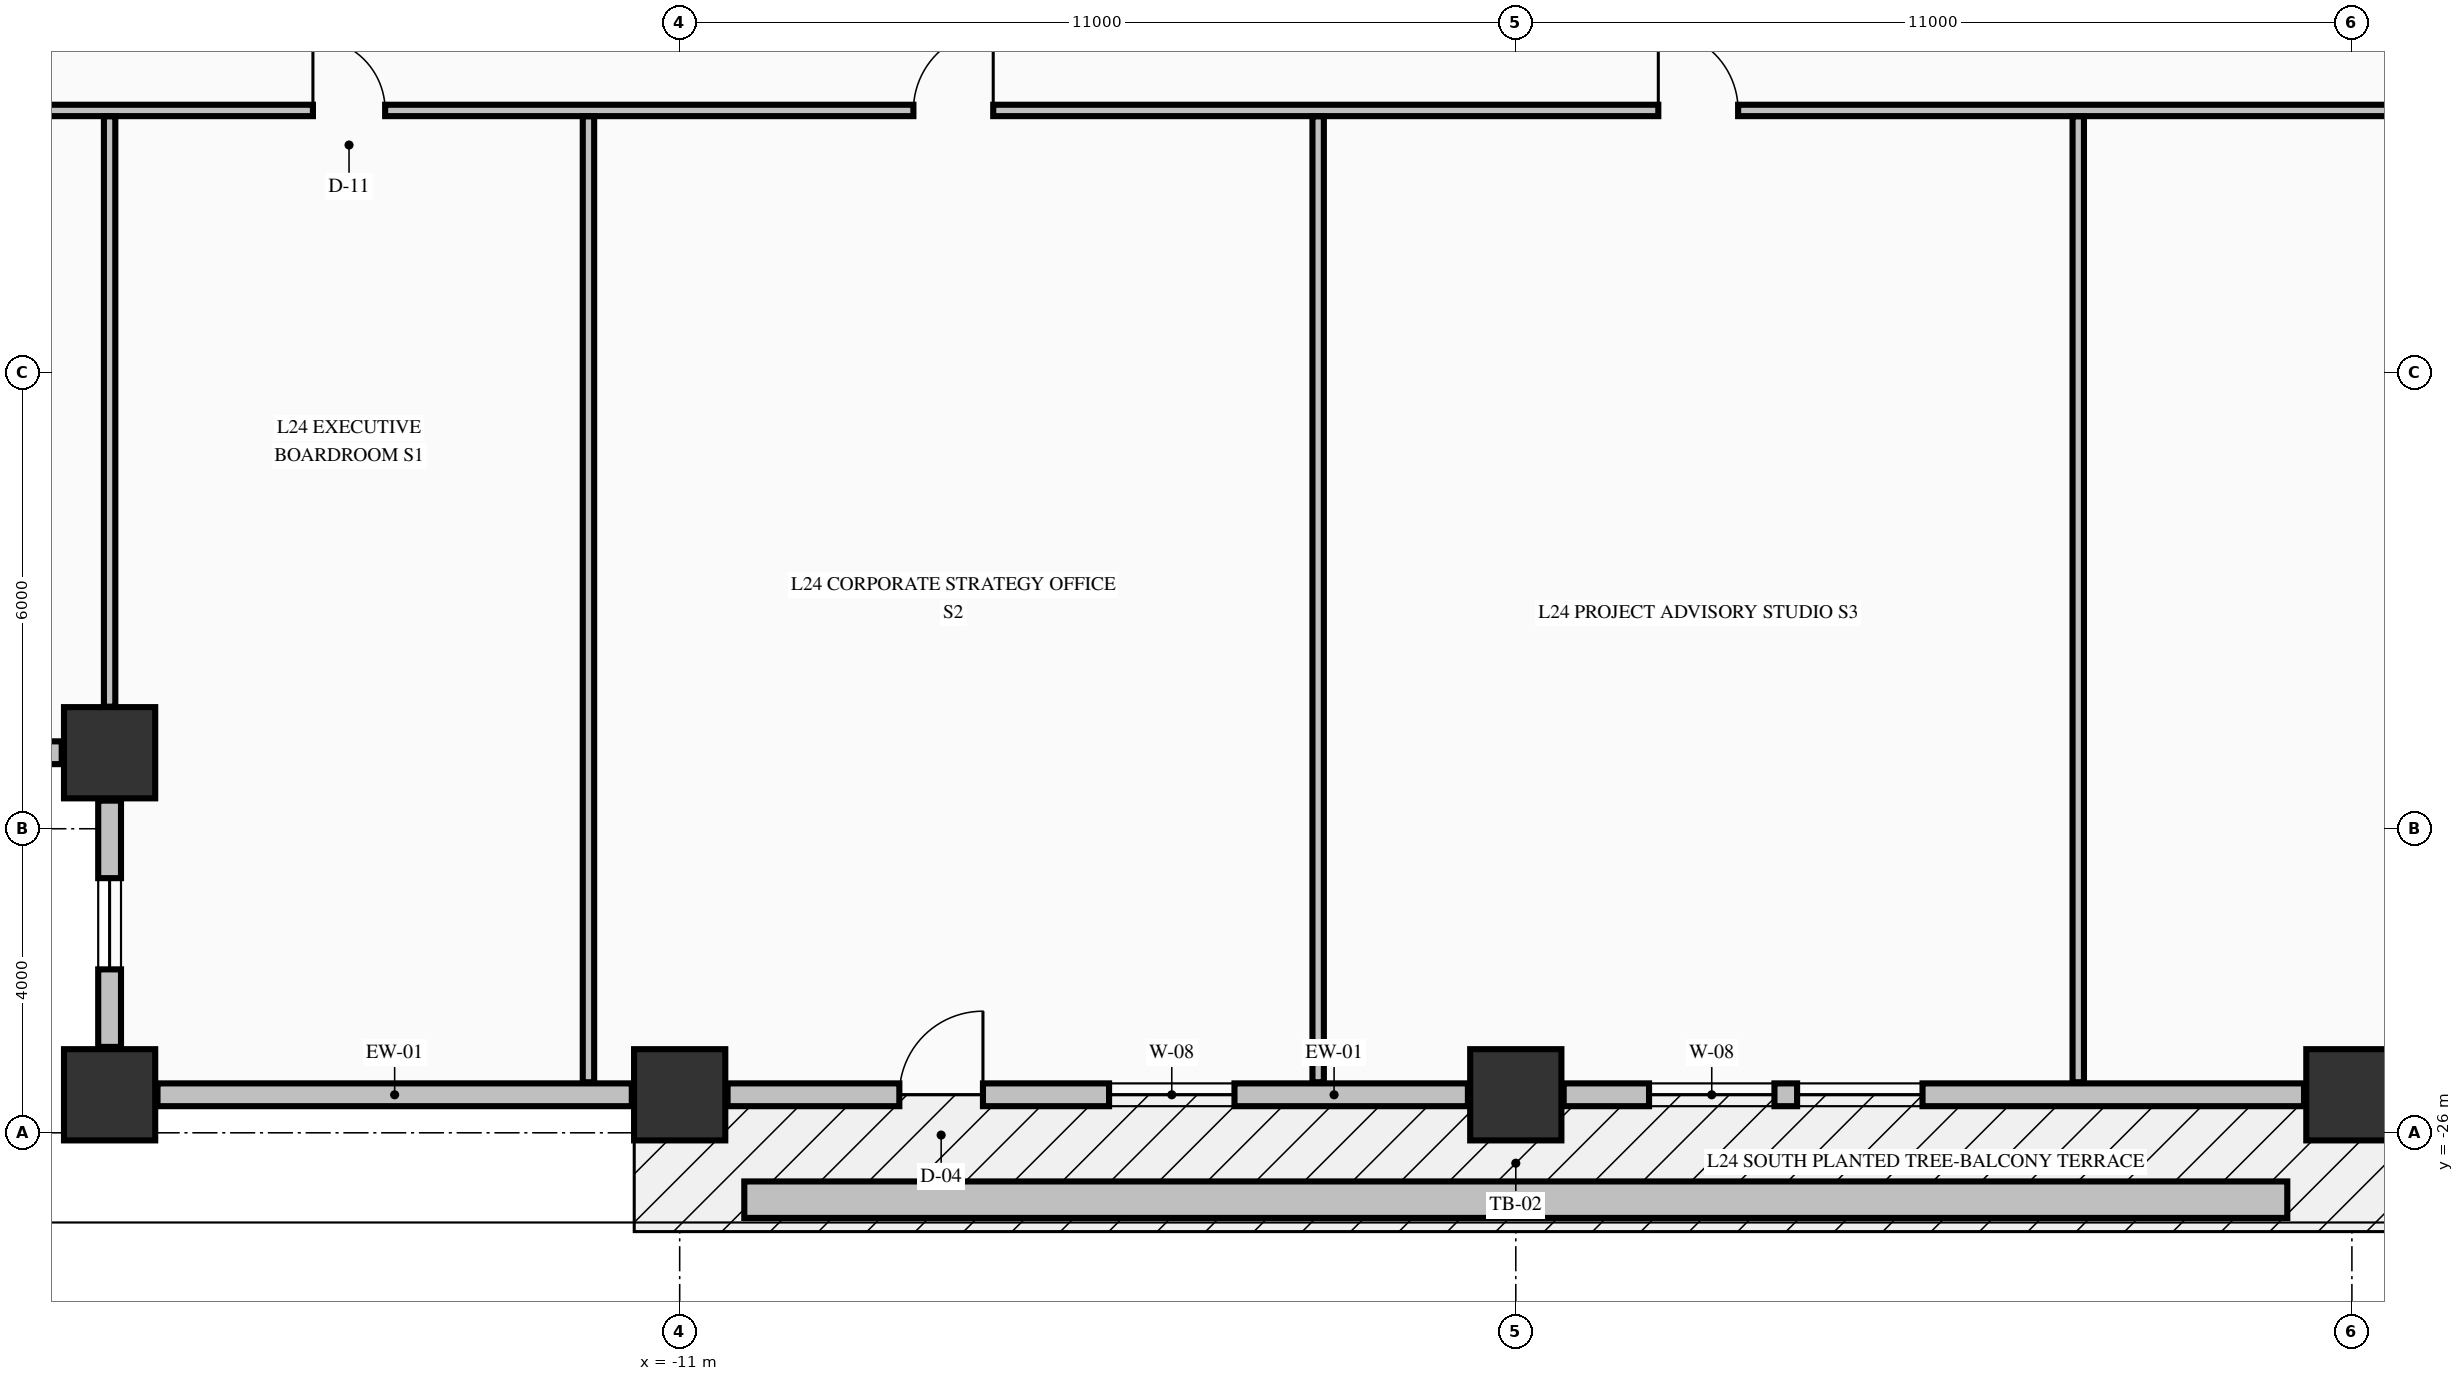
"""IFC4 building model, lengths in metres.
Left out: names, types, materials, properties, quantities, classifications, styles, units other than length and angle.
Written with IfcOpenShell. Run it as: python <this file> out.ifc"""

import sys

from ifc_helpers import new_model, si_unit, direction, frame, frame_2d, origin, origin_2d, place, context, subcontext, project, spatial, rectangle, extrude, element, fill, save


model = new_model("IFC4")
c1 = context("Model", 3, precision=1e-05, world=origin(), true_north=direction((0.0, 1.0)))
c2 = subcontext(c1, "Body", "Model", "MODEL_VIEW")
j1 = project(units=[si_unit("LENGTHUNIT", "METRE"), si_unit("PLANEANGLEUNIT", "RADIAN")], contexts=[c1])
p1 = place(None, origin())
s1 = spatial("IfcSite", under=j1, at=p1, CompositionType="ELEMENT")
p2 = place(p1, origin())
s2 = spatial("IfcBuilding", under=s1, at=p2, CompositionType="ELEMENT")
p3 = place(p2, frame((0.0, 0.0, 98.5)))
s3 = spatial("IfcBuildingStorey", under=s2, at=p3, CompositionType="ELEMENT", Elevation=98.5)
for number, where, z_axis, x_axis in (
    (1, (-18.5, -25.5, -0.275), (0.0, 0.0, 1.0), (1.0, 0.0, 0.0)),
    (2, (-11.0, -25.5, -0.275), (0.0, 0.0, 1.0), (1.0, 0.0, 0.0)),
    (3, (0.0, -25.5, -0.275), (0.0, 0.0, 1.0), (1.0, 0.0, 0.0)),
    (4, (11.0, -25.5, -0.275), (0.0, 0.0, 1.0), (1.0, 0.0, 0.0)),
    (5, (-18.5, -21.0, -0.275), (0.0, 0.0, 1.0), (1.0, 0.0, 0.0)),
):
    element("IfcColumn", number, at=place(p3, frame(where, z_axis=z_axis, x_axis=x_axis)), inside=s3, PredefinedType="COLUMN", context=c2, shape_type="SweptSolid", body=[
        extrude(rectangle(XDim=1.2, YDim=1.2, at=origin_2d()), origin(), (0.0, 0.0, 1.0), 3.595),
    ])
p4 = place(p3, frame((-22.37, -21.0, 0.0), z_axis=(0.0, 0.0, 1.0), x_axis=(1.0, 0.0, 0.0)))
e6 = element("IfcWall", 6, at=p4, inside=s3, PredefinedType="STANDARD", context=c2, shape_type="SweptSolid", body=[
    extrude(rectangle(XDim=3.24, YDim=0.3, at=frame_2d((1.62, 0.0))), origin(), (0.0, 0.0, 1.0), 2.712),
])
p5 = place(p4, frame((1.02, 0.0, 0.82)))
e7 = element("IfcOpeningElement", 7, at=p5, cuts=e6, PredefinedType="OPENING", context=c2, shape_type="SweptSolid", body=[
    extrude(rectangle(XDim=1.2, YDim=1.65, at=frame_2d((0.6, 0.825))), frame((0.0, 0.16, 0.0), z_axis=(0.0, -1.0, 0.0), x_axis=(1.0, 0.0, 0.0)), (0.0, 0.0, 1.0), 0.32),
])
p6 = place(p3, frame((-18.5, -21.63, 0.0), z_axis=(0.0, 0.0, 1.0), x_axis=(0.0, -1.0, 0.0)))
e8 = element("IfcWall", 8, at=p6, inside=s3, PredefinedType="STANDARD", context=c2, shape_type="SweptSolid", body=[
    extrude(rectangle(XDim=3.24, YDim=0.3, at=frame_2d((1.62, 0.0))), origin(), (0.0, 0.0, 1.0), 2.712),
])
p7 = place(p6, frame((1.02, 0.0, 0.82)))
e9 = element("IfcOpeningElement", 9, at=p7, cuts=e8, PredefinedType="OPENING", context=c2, shape_type="SweptSolid", body=[
    extrude(rectangle(XDim=1.2, YDim=1.65, at=frame_2d((0.6, 0.825))), frame((0.0, 0.16, 0.0), z_axis=(0.0, -1.0, 0.0), x_axis=(1.0, 0.0, 0.0)), (0.0, 0.0, 1.0), 0.32),
])
p8 = place(p3, frame((-17.87, -25.5, 0.0), z_axis=(0.0, 0.0, 1.0), x_axis=(1.0, 0.0, 0.0)))
e10 = element("IfcWall", 10, at=p8, inside=s3, PredefinedType="STANDARD", context=c2, shape_type="SweptSolid", body=[
    extrude(rectangle(XDim=6.24, YDim=0.3, at=frame_2d((3.12, 0.0))), origin(), (0.0, 0.0, 1.0), 2.712),
])
p9 = place(p3, frame((-10.37, -25.5, 0.0), z_axis=(0.0, 0.0, 1.0), x_axis=(1.0, 0.0, 0.0)))
e11 = element("IfcWall", 11, at=p9, inside=s3, PredefinedType="STANDARD", context=c2, shape_type="SweptSolid", body=[
    extrude(rectangle(XDim=9.74, YDim=0.3, at=frame_2d((4.87, 0.0))), origin(), (0.0, 0.0, 1.0), 2.712),
])
p10 = place(p9, frame((2.26, 0.0, 0.0)))
e12 = element("IfcOpeningElement", 12, at=p10, cuts=e11, PredefinedType="OPENING", context=c2, shape_type="SweptSolid", body=[
    extrude(rectangle(XDim=1.1, YDim=2.15, at=frame_2d((0.55, 1.075))), frame((0.0, 0.16, 0.0), z_axis=(0.0, -1.0, 0.0), x_axis=(1.0, 0.0, 0.0)), (0.0, 0.0, 1.0), 0.32),
])
p11 = place(p9, frame((5.019, 0.0, 0.8)))
e13 = element("IfcOpeningElement", 13, at=p11, cuts=e11, PredefinedType="OPENING", context=c2, shape_type="SweptSolid", body=[
    extrude(rectangle(XDim=1.65, YDim=1.7, at=frame_2d((0.825, 0.85))), frame((0.0, 0.16, 0.0), z_axis=(0.0, -1.0, 0.0), x_axis=(1.0, 0.0, 0.0)), (0.0, 0.0, 1.0), 0.32),
])
p12 = place(p3, frame((0.63, -25.5, 0.0), z_axis=(0.0, 0.0, 1.0), x_axis=(1.0, 0.0, 0.0)))
e14 = element("IfcWall", 14, at=p12, inside=s3, PredefinedType="STANDARD", context=c2, shape_type="SweptSolid", body=[
    extrude(rectangle(XDim=9.74, YDim=0.3, at=frame_2d((4.87, 0.0))), origin(), (0.0, 0.0, 1.0), 2.712),
])
p13 = place(p12, frame((1.123, 0.0, 0.8)))
e15 = element("IfcOpeningElement", 15, at=p13, cuts=e14, PredefinedType="OPENING", context=c2, shape_type="SweptSolid", body=[
    extrude(rectangle(XDim=1.65, YDim=1.7, at=frame_2d((0.825, 0.85))), frame((0.0, 0.16, 0.0), z_axis=(0.0, -1.0, 0.0), x_axis=(1.0, 0.0, 0.0)), (0.0, 0.0, 1.0), 0.32),
])
p14 = place(p12, frame((3.071, 0.0, 0.8)))
e16 = element("IfcOpeningElement", 16, at=p14, cuts=e14, PredefinedType="OPENING", context=c2, shape_type="SweptSolid", body=[
    extrude(rectangle(XDim=1.65, YDim=1.7, at=frame_2d((0.825, 0.85))), frame((0.0, 0.16, 0.0), z_axis=(0.0, -1.0, 0.0), x_axis=(1.0, 0.0, 0.0)), (0.0, 0.0, 1.0), 0.32),
])
p15 = place(p3, frame((-22.835, -12.55, 0.0), z_axis=(0.0, 0.0, 1.0), x_axis=(1.0, 0.0, 0.0)))
e17 = element("IfcWall", 17, at=p15, inside=s3, PredefinedType="PARTITIONING", context=c2, shape_type="SweptSolid", body=[
    extrude(rectangle(XDim=50.67, YDim=0.15, at=frame_2d((25.335, 0.0))), origin(), (0.0, 0.0, 1.0), 3.32),
])
p16 = place(p15, frame((7.01, 0.0, 0.0)))
e18 = element("IfcOpeningElement", 18, at=p16, cuts=e17, PredefinedType="OPENING", context=c2, shape_type="SweptSolid", body=[
    extrude(rectangle(XDim=0.95, YDim=2.15, at=frame_2d((0.475, 1.075))), frame((0.0, 0.085, 0.0), z_axis=(0.0, -1.0, 0.0), x_axis=(1.0, 0.0, 0.0)), (0.0, 0.0, 1.0), 0.17),
])
p17 = place(p15, frame((14.91, 0.0, 0.0)))
e19 = element("IfcOpeningElement", 19, at=p17, cuts=e17, PredefinedType="OPENING", context=c2, shape_type="SweptSolid", body=[
    extrude(rectangle(XDim=1.05, YDim=2.15, at=frame_2d((0.525, 1.075))), frame((0.0, 0.085, 0.0), z_axis=(0.0, -1.0, 0.0), x_axis=(1.0, 0.0, 0.0)), (0.0, 0.0, 1.0), 0.17),
])
p18 = place(p15, frame((24.71, 0.0, 0.0)))
e20 = element("IfcOpeningElement", 20, at=p18, cuts=e17, PredefinedType="OPENING", context=c2, shape_type="SweptSolid", body=[
    extrude(rectangle(XDim=1.05, YDim=2.15, at=frame_2d((0.525, 1.075))), frame((0.0, 0.085, 0.0), z_axis=(0.0, -1.0, 0.0), x_axis=(1.0, 0.0, 0.0)), (0.0, 0.0, 1.0), 0.17),
])
p19 = place(p15, frame((35.91, 0.0, 0.0)))
e21 = element("IfcOpeningElement", 21, at=p19, cuts=e17, PredefinedType="OPENING", context=c2, shape_type="SweptSolid", body=[
    extrude(rectangle(XDim=1.05, YDim=2.15, at=frame_2d((0.525, 1.075))), frame((0.0, 0.085, 0.0), z_axis=(0.0, -1.0, 0.0), x_axis=(1.0, 0.0, 0.0)), (0.0, 0.0, 1.0), 0.17),
])
p20 = place(p3, frame((-18.5, -20.394, 0.0), z_axis=(0.0, 0.0, 1.0), x_axis=(0.0, 1.0, 0.0)))
e22 = element("IfcWall", 22, at=p20, inside=s3, PredefinedType="PARTITIONING", context=c2, shape_type="SweptSolid", body=[
    extrude(rectangle(XDim=7.766, YDim=0.15, at=frame_2d((3.883, 0.0))), origin(), (0.0, 0.0, 1.0), 3.32),
])
for number, where, z_axis, x_axis in (
    (23, (-12.2, -25.335, 0.0), (0.0, 0.0, 1.0), (0.0, 1.0, 0.0)),
    (24, (-2.6, -25.335, 0.0), (0.0, 0.0, 1.0), (0.0, 1.0, 0.0)),
    (25, (7.4, -25.335, 0.0), (0.0, 0.0, 1.0), (0.0, 1.0, 0.0)),
):
    element("IfcWall", number, at=place(p3, frame(where, z_axis=z_axis, x_axis=x_axis)), inside=s3, PredefinedType="PARTITIONING", context=c2, shape_type="SweptSolid", body=[
        extrude(rectangle(XDim=12.707, YDim=0.15, at=frame_2d((6.354, 0.0))), origin(), (0.0, 0.0, 1.0), 3.32),
    ])
p21 = place(p3, frame((-10.15, -26.88, -0.04), z_axis=(0.0, 0.0, 1.0), x_axis=(1.0, 0.0, 0.0)))
e26 = element("IfcWall", 26, at=p21, inside=s3, PredefinedType="PARAPET", context=c2, shape_type="SweptSolid", body=[
    extrude(rectangle(XDim=20.3, YDim=0.48, at=frame_2d((10.15, 0.0))), origin(), (0.0, 0.0, 1.0), 0.52),
])
p22 = place(p7, origin())
e27 = element("IfcWindow", 27, at=p22, inside=s3, PartitioningType="SINGLE_PANEL", PredefinedType="WINDOW", context=c2, shape_type="SweptSolid", body=[
    extrude(rectangle(XDim=1.2, YDim=1.65, at=frame_2d((0.6, 0.825))), frame((0.0, 0.03, 0.0), z_axis=(0.0, -1.0, 0.0), x_axis=(1.0, 0.0, 0.0)), (0.0, 0.0, 1.0), 0.06),
])
fill(e9, e27)
p23 = place(p10, origin())
e28 = element("IfcDoor", 28, at=p23, inside=s3, OperationType="SINGLE_SWING_RIGHT", PredefinedType="DOOR", context=c2, shape_type="SweptSolid", body=[
    extrude(rectangle(XDim=1.1, YDim=2.15, at=frame_2d((0.55, 1.075))), frame((0.0, 0.025, 0.0), z_axis=(0.0, -1.0, 0.0), x_axis=(1.0, 0.0, 0.0)), (0.0, 0.0, 1.0), 0.05),
])
fill(e12, e28)
p24 = place(p11, origin())
e29 = element("IfcWindow", 29, at=p24, inside=s3, PartitioningType="SINGLE_PANEL", PredefinedType="WINDOW", context=c2, shape_type="SweptSolid", body=[
    extrude(rectangle(XDim=1.65, YDim=1.7, at=frame_2d((0.825, 0.85))), frame((0.0, 0.03, 0.0), z_axis=(0.0, -1.0, 0.0), x_axis=(1.0, 0.0, 0.0)), (0.0, 0.0, 1.0), 0.06),
])
fill(e13, e29)
p25 = place(p13, origin())
e30 = element("IfcWindow", 30, at=p25, inside=s3, PartitioningType="SINGLE_PANEL", PredefinedType="WINDOW", context=c2, shape_type="SweptSolid", body=[
    extrude(rectangle(XDim=1.65, YDim=1.7, at=frame_2d((0.825, 0.85))), frame((0.0, 0.03, 0.0), z_axis=(0.0, -1.0, 0.0), x_axis=(1.0, 0.0, 0.0)), (0.0, 0.0, 1.0), 0.06),
])
fill(e15, e30)
p26 = place(p14, origin())
e31 = element("IfcWindow", 31, at=p26, inside=s3, PartitioningType="SINGLE_PANEL", PredefinedType="WINDOW", context=c2, shape_type="SweptSolid", body=[
    extrude(rectangle(XDim=1.65, YDim=1.7, at=frame_2d((0.825, 0.85))), frame((0.0, 0.03, 0.0), z_axis=(0.0, -1.0, 0.0), x_axis=(1.0, 0.0, 0.0)), (0.0, 0.0, 1.0), 0.06),
])
fill(e16, e31)
p27 = place(p16, origin())
e32 = element("IfcDoor", 32, at=p27, inside=s3, OperationType="SINGLE_SWING_LEFT", PredefinedType="DOOR", context=c2, shape_type="SweptSolid", body=[
    extrude(rectangle(XDim=0.95, YDim=2.15, at=frame_2d((0.475, 1.075))), frame((0.0, 0.025, 0.0), z_axis=(0.0, -1.0, 0.0), x_axis=(1.0, 0.0, 0.0)), (0.0, 0.0, 1.0), 0.05),
])
fill(e18, e32)
p28 = place(p17, origin())
e33 = element("IfcDoor", 33, at=p28, inside=s3, OperationType="SINGLE_SWING_RIGHT", PredefinedType="DOOR", context=c2, shape_type="SweptSolid", body=[
    extrude(rectangle(XDim=1.05, YDim=2.15, at=frame_2d((0.525, 1.075))), frame((0.0, 0.025, 0.0), z_axis=(0.0, -1.0, 0.0), x_axis=(1.0, 0.0, 0.0)), (0.0, 0.0, 1.0), 0.05),
])
fill(e19, e33)
p29 = place(p18, origin())
e34 = element("IfcDoor", 34, at=p29, inside=s3, OperationType="SINGLE_SWING_LEFT", PredefinedType="DOOR", context=c2, shape_type="SweptSolid", body=[
    extrude(rectangle(XDim=1.05, YDim=2.15, at=frame_2d((0.525, 1.075))), frame((0.0, 0.025, 0.0), z_axis=(0.0, -1.0, 0.0), x_axis=(1.0, 0.0, 0.0)), (0.0, 0.0, 1.0), 0.05),
])
fill(e20, e34)
save(model, sys.argv[1])
